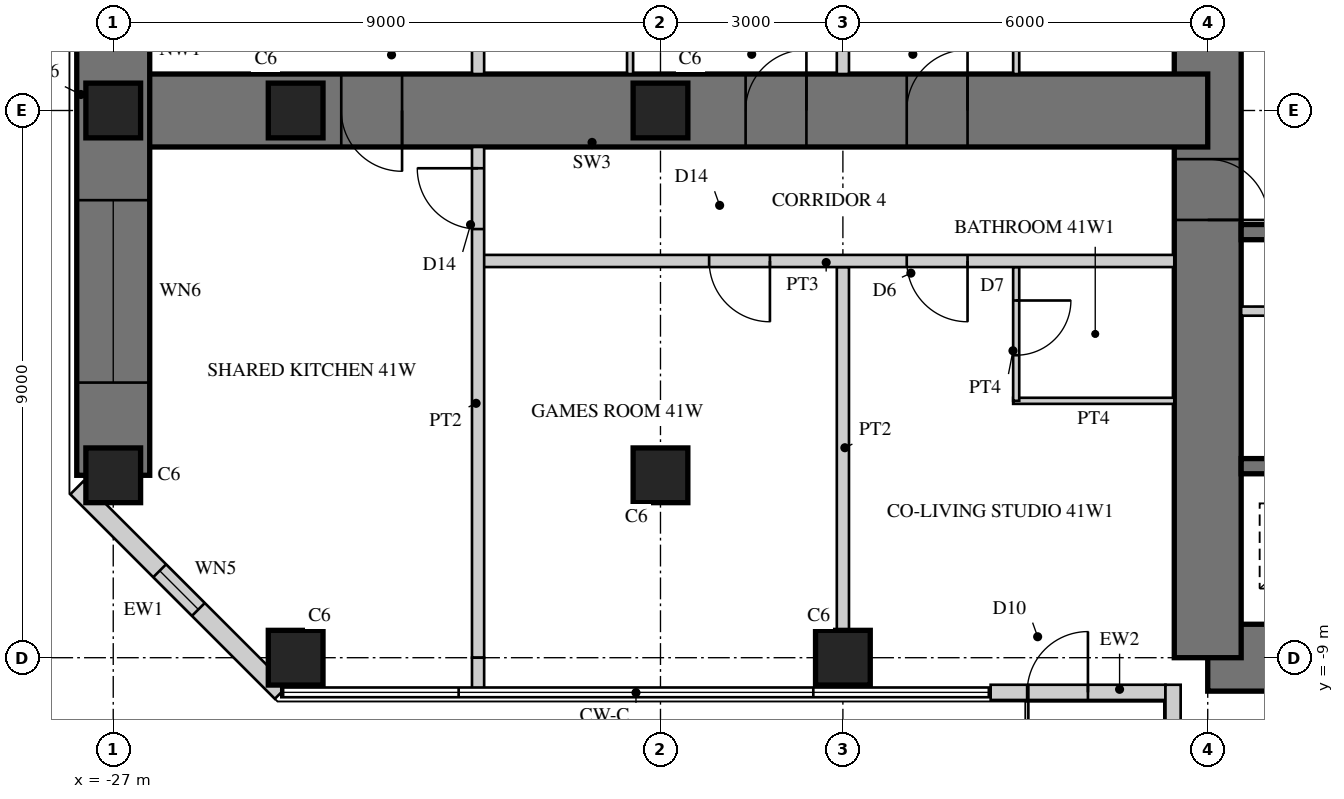
"""IFC4 building model, lengths in metres.
Left out: names, types, materials, properties, quantities, classifications, styles, units other than length and angle.
Written with IfcOpenShell. Run it as: python <this file> out.ifc"""

import sys

from ifc_helpers import new_model, si_unit, direction, frame, frame_2d, origin, origin_2d, place, context, subcontext, project, spatial, rectangle, hollow_rectangle, extrude, element, fill, save


model = new_model("IFC4")
c1 = context("Model", 3, precision=1e-05, world=origin(), true_north=direction((0.0, 1.0)))
c2 = subcontext(c1, "Body", "Model", "MODEL_VIEW")
j1 = project(units=[si_unit("LENGTHUNIT", "METRE"), si_unit("PLANEANGLEUNIT", "RADIAN")], contexts=[c1])
p1 = place(None, origin())
s1 = spatial("IfcSite", under=j1, at=p1, CompositionType="ELEMENT")
p2 = place(p1, origin())
s2 = spatial("IfcBuilding", under=s1, at=p2, CompositionType="ELEMENT")
p3 = place(p2, frame((0.0, 0.0, 169.5)))
s3 = spatial("IfcBuildingStorey", under=s2, at=p3, CompositionType="ELEMENT", Elevation=169.5)
p4 = place(p3, frame((-9.0, -9.0, 0.0), z_axis=(0.0, 0.0, 1.0), x_axis=(1.0, 0.0, 0.0)))
e1 = element("IfcWall", 1, at=p4, inside=s3, PredefinedType="SHEAR", context=c2, shape_type="SweptSolid", body=[
    extrude(rectangle(XDim=18.0, YDim=1.1, at=frame_2d((9.0, 0.0))), origin(), (0.0, 0.0, 1.0), 3.4),
])
p5 = place(p4, frame((9.8, 0.0, 0.0)))
e2 = element("IfcOpeningElement", 2, at=p5, cuts=e1, PredefinedType="OPENING", context=c2, shape_type="SweptSolid", body=[
    extrude(rectangle(XDim=1.0, YDim=2.4, at=frame_2d((0.5, 1.2))), frame((0.0, 0.56, 0.0), z_axis=(0.0, -1.0, 0.0), x_axis=(1.0, 0.0, 0.0)), (0.0, 0.0, 1.0), 1.12),
])
p6 = place(p3, frame((-9.0, 9.0, 0.0), z_axis=(0.0, 0.0, 1.0), x_axis=(0.0, -1.0, 0.0)))
e3 = element("IfcWall", 3, at=p6, inside=s3, PredefinedType="SHEAR", context=c2, shape_type="SweptSolid", body=[
    extrude(rectangle(XDim=18.0, YDim=1.1, at=frame_2d((9.0, 0.0))), origin(), (0.0, 0.0, 1.0), 3.4),
])
p7 = place(p6, frame((9.8, 0.0, 0.0)))
e4 = element("IfcOpeningElement", 4, at=p7, cuts=e3, PredefinedType="OPENING", context=c2, shape_type="SweptSolid", body=[
    extrude(rectangle(XDim=1.0, YDim=2.4, at=frame_2d((0.5, 1.2))), frame((0.0, 0.56, 0.0), z_axis=(0.0, -1.0, 0.0), x_axis=(1.0, 0.0, 0.0)), (0.0, 0.0, 1.0), 1.12),
])
p8 = place(p3, frame((-1.925, -2.0, 0.0), z_axis=(0.0, 0.0, 1.0), x_axis=(-1.0, 0.0, 0.0)))
e5 = element("IfcWall", 5, at=p8, inside=s3, PredefinedType="SHEAR", context=c2, shape_type="SweptSolid", body=[
    extrude(rectangle(XDim=6.525, YDim=0.25, at=frame_2d((3.262, 0.0))), origin(), (0.0, 0.0, 1.0), 3.4),
])
p9 = place(p3, frame((-1.925, -5.85, 0.0), z_axis=(0.0, 0.0, 1.0), x_axis=(-1.0, 0.0, 0.0)))
e6 = element("IfcWall", 6, at=p9, inside=s3, PredefinedType="SHEAR", context=c2, shape_type="SweptSolid", body=[
    extrude(rectangle(XDim=6.525, YDim=0.25, at=frame_2d((3.262, 0.0))), origin(), (0.0, 0.0, 1.0), 3.4),
])
p10 = place(p9, frame((0.471, 0.0, 0.0)))
e7 = element("IfcOpeningElement", 7, at=p10, cuts=e6, PredefinedType="OPENING", context=c2, shape_type="SweptSolid", body=[
    extrude(rectangle(XDim=1.1, YDim=2.2, at=frame_2d((0.55, 1.1))), frame((0.0, 0.135, 0.0), z_axis=(0.0, -1.0, 0.0), x_axis=(1.0, 0.0, 0.0)), (0.0, 0.0, 1.0), 0.27),
])
p11 = place(p9, frame((2.712, 0.0, 0.0)))
e8 = element("IfcOpeningElement", 8, at=p11, cuts=e6, PredefinedType="OPENING", context=c2, shape_type="SweptSolid", body=[
    extrude(rectangle(XDim=1.1, YDim=2.2, at=frame_2d((0.55, 1.1))), frame((0.0, 0.135, 0.0), z_axis=(0.0, -1.0, 0.0), x_axis=(1.0, 0.0, 0.0)), (0.0, 0.0, 1.0), 0.27),
])
p12 = place(p9, frame((4.954, 0.0, 0.0)))
e9 = element("IfcOpeningElement", 9, at=p12, cuts=e6, PredefinedType="OPENING", context=c2, shape_type="SweptSolid", body=[
    extrude(rectangle(XDim=1.1, YDim=2.2, at=frame_2d((0.55, 1.1))), frame((0.0, 0.135, 0.0), z_axis=(0.0, -1.0, 0.0), x_axis=(1.0, 0.0, 0.0)), (0.0, 0.0, 1.0), 0.27),
])
p13 = place(p3, frame((-1.925, -3.3, 0.0), z_axis=(0.0, 0.0, 1.0), x_axis=(-1.0, 0.0, 0.0)))
e10 = element("IfcWall", 10, at=p13, inside=s3, PredefinedType="PARTITIONING", context=c2, shape_type="SweptSolid", body=[
    extrude(rectangle(XDim=6.525, YDim=0.15, at=frame_2d((3.262, 0.0))), origin(), (0.0, 0.0, 1.0), 3.4),
])
p14 = place(p13, frame((0.075, 0.0, 0.0)))
e11 = element("IfcOpeningElement", 11, at=p14, cuts=e10, PredefinedType="OPENING", context=c2, shape_type="SweptSolid", body=[
    extrude(rectangle(XDim=0.8, YDim=2.1, at=frame_2d((0.4, 1.05))), frame((0.0, 0.085, 0.0), z_axis=(0.0, -1.0, 0.0), x_axis=(1.0, 0.0, 0.0)), (0.0, 0.0, 1.0), 0.17),
])
p15 = place(p13, frame((3.675, 0.0, 0.0)))
e12 = element("IfcOpeningElement", 12, at=p15, cuts=e10, PredefinedType="OPENING", context=c2, shape_type="SweptSolid", body=[
    extrude(rectangle(XDim=0.8, YDim=2.1, at=frame_2d((0.4, 1.05))), frame((0.0, 0.085, 0.0), z_axis=(0.0, -1.0, 0.0), x_axis=(1.0, 0.0, 0.0)), (0.0, 0.0, 1.0), 0.17),
])
p16 = place(p3, frame((-9.0, 0.0, 0.0), z_axis=(0.0, 0.0, 1.0), x_axis=(-1.0, 0.0, 0.0)))
e13 = element("IfcWall", 13, at=p16, inside=s3, PredefinedType="SHEAR", context=c2, shape_type="SweptSolid", body=[
    extrude(rectangle(XDim=18.0, YDim=1.2, at=frame_2d((9.0, 0.0))), origin(), (0.0, 0.0, 1.0), 3.4),
])
p17 = place(p16, frame((3.95, 0.0, 0.0)))
e14 = element("IfcOpeningElement", 14, at=p17, cuts=e13, PredefinedType="OPENING", context=c2, shape_type="SweptSolid", body=[
    extrude(rectangle(XDim=1.0, YDim=2.15, at=frame_2d((0.5, 1.075))), frame((0.0, 0.61, 0.0), z_axis=(0.0, -1.0, 0.0), x_axis=(1.0, 0.0, 0.0)), (0.0, 0.0, 1.0), 1.22),
])
p18 = place(p16, frame((6.6, 0.0, 0.0)))
e15 = element("IfcOpeningElement", 15, at=p18, cuts=e13, PredefinedType="OPENING", context=c2, shape_type="SweptSolid", body=[
    extrude(rectangle(XDim=1.0, YDim=2.15, at=frame_2d((0.5, 1.075))), frame((0.0, 0.61, 0.0), z_axis=(0.0, -1.0, 0.0), x_axis=(1.0, 0.0, 0.0)), (0.0, 0.0, 1.0), 1.22),
])
p19 = place(p16, frame((13.25, 0.0, 0.0)))
e16 = element("IfcOpeningElement", 16, at=p19, cuts=e13, PredefinedType="OPENING", context=c2, shape_type="SweptSolid", body=[
    extrude(rectangle(XDim=1.0, YDim=2.2, at=frame_2d((0.5, 1.1))), frame((0.0, 0.61, 0.0), z_axis=(0.0, -1.0, 0.0), x_axis=(1.0, 0.0, 0.0)), (0.0, 0.0, 1.0), 1.22),
])
p20 = place(p3, frame((-27.0, 6.0, 0.0), z_axis=(0.0, 0.0, 1.0), x_axis=(0.0, -1.0, 0.0)))
e17 = element("IfcWall", 17, at=p20, inside=s3, PredefinedType="SHEAR", context=c2, shape_type="SweptSolid", body=[
    extrude(rectangle(XDim=12.0, YDim=1.2, at=frame_2d((6.0, 0.0))), origin(), (0.0, 0.0, 1.0), 3.4),
])
p21 = place(p20, frame((1.525, 0.0, 0.6)))
e18 = element("IfcOpeningElement", 18, at=p21, cuts=e17, PredefinedType="OPENING", context=c2, shape_type="SweptSolid", body=[
    extrude(rectangle(XDim=3.0, YDim=2.4, at=frame_2d((1.5, 1.2))), frame((0.0, 0.61, 0.0), z_axis=(0.0, -1.0, 0.0), x_axis=(1.0, 0.0, 0.0)), (0.0, 0.0, 1.0), 1.22),
])
p22 = place(p20, frame((7.475, 0.0, 0.6)))
e19 = element("IfcOpeningElement", 19, at=p22, cuts=e17, PredefinedType="OPENING", context=c2, shape_type="SweptSolid", body=[
    extrude(rectangle(XDim=3.0, YDim=2.4, at=frame_2d((1.5, 1.2))), frame((0.0, 0.61, 0.0), z_axis=(0.0, -1.0, 0.0), x_axis=(1.0, 0.0, 0.0)), (0.0, 0.0, 1.0), 1.22),
])
for number, where, z_axis, x_axis in (
    (20, (-15.0, -9.0, 0.0), (0.0, 0.0, 1.0), (1.0, 0.0, 0.0)),
    (21, (-24.0, -9.0, 0.0), (0.0, 0.0, 1.0), (1.0, 0.0, 0.0)),
    (22, (-27.0, 0.0, 0.0), (0.0, 0.0, 1.0), (1.0, 0.0, 0.0)),
    (23, (-27.0, -6.0, 0.0), (0.0, 0.0, 1.0), (1.0, 0.0, 0.0)),
    (24, (-18.0, 0.0, 0.0), (0.0, 0.0, 1.0), (1.0, 0.0, 0.0)),
    (25, (-18.0, -6.0, 0.0), (0.0, 0.0, 1.0), (1.0, 0.0, 0.0)),
    (26, (-24.0, 0.0, 0.0), (0.0, 0.0, 1.0), (1.0, 0.0, 0.0)),
):
    element("IfcColumn", number, at=place(p3, frame(where, z_axis=z_axis, x_axis=x_axis)), inside=s3, PredefinedType="COLUMN", context=c2, shape_type="SweptSolid", body=[
        extrude(rectangle(XDim=0.9, YDim=0.9, at=origin_2d()), origin(), (0.0, 0.0, 1.0), 3.4),
    ])
p23 = place(p3, frame((-27.6, -6.206, 0.0), z_axis=(0.0, 0.0, 1.0), x_axis=(0.707106781187, -0.707106781187, 0.0)))
e27 = element("IfcWall", 27, at=p23, inside=s3, PredefinedType="SOLIDWALL", context=c2, shape_type="SweptSolid", body=[
    extrude(rectangle(XDim=4.757, YDim=0.3, at=frame_2d((2.379, 0.0))), origin(), (0.0, 0.0, 1.0), 3.22),
])
p24 = place(p23, frame((1.929, 0.0, 0.3)))
e28 = element("IfcOpeningElement", 28, at=p24, cuts=e27, PredefinedType="OPENING", context=c2, shape_type="SweptSolid", body=[
    extrude(rectangle(XDim=0.9, YDim=2.4, at=frame_2d((0.45, 1.2))), frame((0.0, 0.16, 0.0), z_axis=(0.0, -1.0, 0.0), x_axis=(1.0, 0.0, 0.0)), (0.0, 0.0, 1.0), 0.32),
])
p25 = place(p3, frame((-12.57, -9.57, 0.0), z_axis=(0.0, 0.0, 1.0), x_axis=(1.0, 0.0, 0.0)))
e29 = element("IfcWall", 29, at=p25, inside=s3, PredefinedType="SOLIDWALL", context=c2, shape_type="SweptSolid", body=[
    extrude(rectangle(XDim=2.875, YDim=0.25, at=frame_2d((1.438, 0.0))), origin(), (0.0, 0.0, 1.0), 3.22),
])
p26 = place(p25, frame((0.6, 0.0, 0.0)))
e30 = element("IfcOpeningElement", 30, at=p26, cuts=e29, PredefinedType="OPENING", context=c2, shape_type="SweptSolid", body=[
    extrude(rectangle(XDim=1.0, YDim=2.2, at=frame_2d((0.5, 1.1))), frame((0.0, 0.135, 0.0), z_axis=(0.0, -1.0, 0.0), x_axis=(1.0, 0.0, 0.0)), (0.0, 0.0, 1.0), 0.27),
])
p27 = place(p3, frame((-9.57, -9.445, 0.0), z_axis=(0.0, 0.0, 1.0), x_axis=(0.0, -1.0, 0.0)))
e31 = element("IfcWall", 31, at=p27, inside=s3, PredefinedType="SOLIDWALL", context=c2, shape_type="SweptSolid", body=[
    extrude(rectangle(XDim=3.125, YDim=0.25, at=frame_2d((1.562, 0.0))), origin(), (0.0, 0.0, 1.0), 3.22),
])
p28 = place(p27, frame((0.6, 0.0, 0.0)))
e32 = element("IfcOpeningElement", 32, at=p28, cuts=e31, PredefinedType="OPENING", context=c2, shape_type="SweptSolid", body=[
    extrude(rectangle(XDim=1.0, YDim=2.2, at=frame_2d((0.5, 1.1))), frame((0.0, 0.135, 0.0), z_axis=(0.0, -1.0, 0.0), x_axis=(1.0, 0.0, 0.0)), (0.0, 0.0, 1.0), 0.27),
])
p29 = place(p3, frame((-9.55, -4.775, 0.0), z_axis=(0.0, 0.0, 1.0), x_axis=(-1.0, 0.0, 0.0)))
e33 = element("IfcWall", 33, at=p29, inside=s3, PredefinedType="PARTITIONING", context=c2, shape_type="SweptSolid", body=[
    extrude(rectangle(XDim=2.65, YDim=0.1, at=frame_2d((1.325, 0.0))), origin(), (0.0, 0.0, 1.0), 3.22),
])
p30 = place(p3, frame((-12.15, -2.575, 0.0), z_axis=(0.0, 0.0, 1.0), x_axis=(0.0, -1.0, 0.0)))
e34 = element("IfcWall", 34, at=p30, inside=s3, PredefinedType="PARTITIONING", context=c2, shape_type="SweptSolid", body=[
    extrude(rectangle(XDim=2.2, YDim=0.1, at=frame_2d((1.1, 0.0))), origin(), (0.0, 0.0, 1.0), 3.22),
])
p31 = place(p30, frame((0.55, 0.0, 0.0)))
e35 = element("IfcOpeningElement", 35, at=p31, cuts=e34, PredefinedType="OPENING", context=c2, shape_type="SweptSolid", body=[
    extrude(rectangle(XDim=0.9, YDim=2.1, at=frame_2d((0.45, 1.05))), frame((0.0, 0.06, 0.0), z_axis=(0.0, -1.0, 0.0), x_axis=(1.0, 0.0, 0.0)), (0.0, 0.0, 1.0), 0.12),
])
p32 = place(p3, frame((-12.15, 9.445, 0.0), z_axis=(0.0, 0.0, 1.0), x_axis=(0.0, -1.0, 0.0)))
e36 = element("IfcWall", 36, at=p32, inside=s3, PredefinedType="PARTITIONING", context=c2, shape_type="SweptSolid", body=[
    extrude(rectangle(XDim=8.845, YDim=0.1, at=frame_2d((4.422, 0.0))), origin(), (0.0, 0.0, 1.0), 3.22),
])
p33 = place(p32, frame((5.295, 0.0, 0.0)))
e37 = element("IfcOpeningElement", 37, at=p33, cuts=e36, PredefinedType="OPENING", context=c2, shape_type="SweptSolid", body=[
    extrude(rectangle(XDim=0.9, YDim=2.1, at=frame_2d((0.45, 1.05))), frame((0.0, 0.06, 0.0), z_axis=(0.0, -1.0, 0.0), x_axis=(1.0, 0.0, 0.0)), (0.0, 0.0, 1.0), 0.12),
])
p34 = place(p32, frame((7.395, 0.0, 0.0)))
e38 = element("IfcOpeningElement", 38, at=p34, cuts=e36, PredefinedType="OPENING", context=c2, shape_type="SweptSolid", body=[
    extrude(rectangle(XDim=0.9, YDim=2.1, at=frame_2d((0.45, 1.05))), frame((0.0, 0.06, 0.0), z_axis=(0.0, -1.0, 0.0), x_axis=(1.0, 0.0, 0.0)), (0.0, 0.0, 1.0), 0.12),
])
p35 = place(p3, frame((-15.0, -2.575, 0.0), z_axis=(0.0, 0.0, 1.0), x_axis=(0.0, -1.0, 0.0)))
e39 = element("IfcWall", 39, at=p35, inside=s3, PredefinedType="SOLIDWALL", context=c2, shape_type="SweptSolid", body=[
    extrude(rectangle(XDim=5.975, YDim=0.2, at=frame_2d((2.988, 0.0))), origin(), (0.0, 0.0, 1.0), 2.47),
])
p36 = place(p3, frame((-15.0, 8.55, 0.0), z_axis=(0.0, 0.0, 1.0), x_axis=(0.0, -1.0, 0.0)))
e40 = element("IfcWall", 40, at=p36, inside=s3, PredefinedType="SOLIDWALL", context=c2, shape_type="SweptSolid", body=[
    extrude(rectangle(XDim=7.95, YDim=0.2, at=frame_2d((3.975, 0.0))), origin(), (0.0, 0.0, 1.0), 2.47),
])
p37 = place(p3, frame((-18.5, 2.8, 0.0), z_axis=(0.0, 0.0, 1.0), x_axis=(0.0, -1.0, 0.0)))
e41 = element("IfcWall", 41, at=p37, inside=s3, PredefinedType="PARTITIONING", context=c2, shape_type="SweptSolid", body=[
    extrude(rectangle(XDim=2.2, YDim=0.1, at=frame_2d((1.1, 0.0))), origin(), (0.0, 0.0, 1.0), 3.22),
])
p38 = place(p37, frame((0.55, 0.0, 0.0)))
e42 = element("IfcOpeningElement", 42, at=p38, cuts=e41, PredefinedType="OPENING", context=c2, shape_type="SweptSolid", body=[
    extrude(rectangle(XDim=0.9, YDim=2.1, at=frame_2d((0.45, 1.05))), frame((0.0, 0.06, 0.0), z_axis=(0.0, -1.0, 0.0), x_axis=(1.0, 0.0, 0.0)), (0.0, 0.0, 1.0), 0.12),
])
p39 = place(p3, frame((-9.55, -2.475, 0.0), z_axis=(0.0, 0.0, 1.0), x_axis=(-1.0, 0.0, 0.0)))
e43 = element("IfcWall", 43, at=p39, inside=s3, PredefinedType="SOLIDWALL", context=c2, shape_type="SweptSolid", body=[
    extrude(rectangle(XDim=11.45, YDim=0.2, at=frame_2d((5.725, 0.0))), origin(), (0.0, 0.0, 1.0), 3.22),
])
p40 = place(p39, frame((3.4, 0.0, 0.0)))
e44 = element("IfcOpeningElement", 44, at=p40, cuts=e43, PredefinedType="OPENING", context=c2, shape_type="SweptSolid", body=[
    extrude(rectangle(XDim=1.0, YDim=2.15, at=frame_2d((0.5, 1.075))), frame((0.0, 0.11, 0.0), z_axis=(0.0, -1.0, 0.0), x_axis=(1.0, 0.0, 0.0)), (0.0, 0.0, 1.0), 0.22),
])
p41 = place(p39, frame((6.65, 0.0, 0.0)))
e45 = element("IfcOpeningElement", 45, at=p41, cuts=e43, PredefinedType="OPENING", context=c2, shape_type="SweptSolid", body=[
    extrude(rectangle(XDim=1.0, YDim=2.2, at=frame_2d((0.5, 1.1))), frame((0.0, 0.11, 0.0), z_axis=(0.0, -1.0, 0.0), x_axis=(1.0, 0.0, 0.0)), (0.0, 0.0, 1.0), 0.22),
])
p42 = place(p3, frame((-21.0, 9.0, 0.0), z_axis=(0.0, 0.0, 1.0), x_axis=(0.0, -1.0, 0.0)))
e46 = element("IfcWall", 46, at=p42, inside=s3, PredefinedType="SOLIDWALL", context=c2, shape_type="SweptSolid", body=[
    extrude(rectangle(XDim=8.4, YDim=0.2, at=frame_2d((4.2, 0.0))), origin(), (0.0, 0.0, 1.0), 2.62),
])
p43 = place(p3, frame((-21.0, -0.6, 0.0), z_axis=(0.0, 0.0, 1.0), x_axis=(0.0, -1.0, 0.0)))
e47 = element("IfcWall", 47, at=p43, inside=s3, PredefinedType="SOLIDWALL", context=c2, shape_type="SweptSolid", body=[
    extrude(rectangle(XDim=8.4, YDim=0.2, at=frame_2d((4.2, 0.0))), origin(), (0.0, 0.0, 1.0), 2.62),
])
p44 = place(p43, frame((0.35, 0.0, 0.0)))
e48 = element("IfcOpeningElement", 48, at=p44, cuts=e47, PredefinedType="OPENING", context=c2, shape_type="SweptSolid", body=[
    extrude(rectangle(XDim=1.0, YDim=2.2, at=frame_2d((0.5, 1.1))), frame((0.0, 0.11, 0.0), z_axis=(0.0, -1.0, 0.0), x_axis=(1.0, 0.0, 0.0)), (0.0, 0.0, 1.0), 0.22),
])
p45 = place(p3, frame((-21.0, -9.0, 0.0), z_axis=(0.0, 0.0, 1.0), x_axis=(0.0, -1.0, 0.0)))
e49 = element("IfcWall", 49, at=p45, inside=s3, PredefinedType="SOLIDWALL", context=c2, shape_type="SweptSolid", body=[
    extrude(rectangle(XDim=0.53, YDim=0.2, at=frame_2d((0.265, 0.0))), origin(), (0.0, 0.0, 1.0), 3.22),
])
p46 = place(p22, origin())
e50 = element("IfcWindow", 50, at=p46, inside=s3, PartitioningType="SINGLE_PANEL", PredefinedType="WINDOW", context=c2, shape_type="SweptSolid", body=[
    extrude(hollow_rectangle(XDim=3.0, YDim=2.4, WallThickness=0.06, at=frame_2d((1.5, 1.2))), frame((0.0, 0.03, 0.0), z_axis=(0.0, -1.0, 0.0), x_axis=(1.0, 0.0, 0.0)), (0.0, 0.0, 1.0), 0.06),
    extrude(rectangle(XDim=2.879, YDim=2.279, at=frame_2d((1.5, 1.2))), frame((0.0, 0.03, 0.0), z_axis=(0.0, -1.0, 0.0), x_axis=(1.0, 0.0, 0.0)), (0.0, 0.0, 1.0), 0.06),
])
fill(e19, e50)
p47 = place(p24, origin())
e51 = element("IfcWindow", 51, at=p47, inside=s3, PartitioningType="SINGLE_PANEL", PredefinedType="WINDOW", context=c2, shape_type="SweptSolid", body=[
    extrude(hollow_rectangle(XDim=0.9, YDim=2.4, WallThickness=0.06, at=frame_2d((0.45, 1.2))), frame((0.0, 0.03, 0.0), z_axis=(0.0, -1.0, 0.0), x_axis=(1.0, 0.0, 0.0)), (0.0, 0.0, 1.0), 0.06),
    extrude(rectangle(XDim=0.779, YDim=2.279, at=frame_2d((0.45, 1.2))), frame((0.0, 0.03, 0.0), z_axis=(0.0, -1.0, 0.0), x_axis=(1.0, 0.0, 0.0)), (0.0, 0.0, 1.0), 0.06),
])
fill(e28, e51)
p48 = place(p26, origin())
e52 = element("IfcDoor", 52, at=p48, inside=s3, OperationType="SINGLE_SWING_RIGHT", PredefinedType="DOOR", context=c2, shape_type="SweptSolid", body=[
    extrude(hollow_rectangle(XDim=1.0, YDim=2.2, WallThickness=0.06, at=frame_2d((0.5, 1.1))), frame((0.0, 0.025, 0.0), z_axis=(0.0, -1.0, 0.0), x_axis=(1.0, 0.0, 0.0)), (0.0, 0.0, 1.0), 0.05),
    extrude(rectangle(XDim=0.879, YDim=2.079, at=frame_2d((0.5, 1.1))), frame((0.0, 0.025, 0.0), z_axis=(0.0, -1.0, 0.0), x_axis=(1.0, 0.0, 0.0)), (0.0, 0.0, 1.0), 0.05),
])
fill(e30, e52)
p49 = place(p31, origin())
e53 = element("IfcDoor", 53, at=p49, inside=s3, OperationType="SINGLE_SWING_LEFT", PredefinedType="DOOR", context=c2, shape_type="SweptSolid", body=[
    extrude(rectangle(XDim=0.9, YDim=2.1, at=frame_2d((0.45, 1.05))), frame((0.0, 0.025, 0.0), z_axis=(0.0, -1.0, 0.0), x_axis=(1.0, 0.0, 0.0)), (0.0, 0.0, 1.0), 0.05),
])
fill(e35, e53)
p50 = place(p40, origin())
e54 = element("IfcDoor", 54, at=p50, inside=s3, OperationType="SINGLE_SWING_LEFT", PredefinedType="DOOR", context=c2, shape_type="SweptSolid", body=[
    extrude(rectangle(XDim=1.0, YDim=2.15, at=frame_2d((0.5, 1.075))), frame((0.0, 0.025, 0.0), z_axis=(0.0, -1.0, 0.0), x_axis=(1.0, 0.0, 0.0)), (0.0, 0.0, 1.0), 0.05),
])
fill(e44, e54)
p51 = place(p41, origin())
e55 = element("IfcDoor", 55, at=p51, inside=s3, OperationType="SINGLE_SWING_LEFT", PredefinedType="DOOR", context=c2, shape_type="SweptSolid", body=[
    extrude(rectangle(XDim=1.0, YDim=2.2, at=frame_2d((0.5, 1.1))), frame((0.0, 0.025, 0.0), z_axis=(0.0, -1.0, 0.0), x_axis=(1.0, 0.0, 0.0)), (0.0, 0.0, 1.0), 0.05),
])
fill(e45, e55)
p52 = place(p44, frame((1.0, 0.0, 0.0), z_axis=(0.0, 0.0, 1.0), x_axis=(-1.0, 0.0, 0.0)))
e56 = element("IfcDoor", 56, at=p52, inside=s3, OperationType="SINGLE_SWING_RIGHT", PredefinedType="DOOR", context=c2, shape_type="SweptSolid", body=[
    extrude(rectangle(XDim=1.0, YDim=2.2, at=frame_2d((0.5, 1.1))), frame((0.0, 0.025, 0.0), z_axis=(0.0, -1.0, 0.0), x_axis=(1.0, 0.0, 0.0)), (0.0, 0.0, 1.0), 0.05),
])
fill(e48, e56)
p53 = place(p17, frame((1.0, 0.0, 0.0), z_axis=(0.0, 0.0, 1.0), x_axis=(-1.0, 0.0, 0.0)))
e57 = element("IfcDoor", 57, at=p53, inside=s3, OperationType="SINGLE_SWING_RIGHT", PredefinedType="DOOR", context=c2, shape_type="SweptSolid", body=[
    extrude(rectangle(XDim=1.0, YDim=2.15, at=frame_2d((0.5, 1.075))), frame((0.0, 0.025, 0.0), z_axis=(0.0, -1.0, 0.0), x_axis=(1.0, 0.0, 0.0)), (0.0, 0.0, 1.0), 0.05),
])
fill(e14, e57)
p54 = place(p18, frame((1.0, 0.0, 0.0), z_axis=(0.0, 0.0, 1.0), x_axis=(-1.0, 0.0, 0.0)))
e58 = element("IfcDoor", 58, at=p54, inside=s3, OperationType="SINGLE_SWING_RIGHT", PredefinedType="DOOR", context=c2, shape_type="SweptSolid", body=[
    extrude(rectangle(XDim=1.0, YDim=2.15, at=frame_2d((0.5, 1.075))), frame((0.0, 0.025, 0.0), z_axis=(0.0, -1.0, 0.0), x_axis=(1.0, 0.0, 0.0)), (0.0, 0.0, 1.0), 0.05),
])
fill(e15, e58)
p55 = place(p19, origin())
e59 = element("IfcDoor", 59, at=p55, inside=s3, OperationType="SINGLE_SWING_LEFT", PredefinedType="DOOR", context=c2, shape_type="SweptSolid", body=[
    extrude(rectangle(XDim=1.0, YDim=2.2, at=frame_2d((0.5, 1.1))), frame((0.0, 0.025, 0.0), z_axis=(0.0, -1.0, 0.0), x_axis=(1.0, 0.0, 0.0)), (0.0, 0.0, 1.0), 0.05),
])
fill(e16, e59)
p56 = place(p7, origin())
e60 = element("IfcDoor", 60, at=p56, inside=s3, OperationType="SINGLE_SWING_RIGHT", PredefinedType="DOOR", context=c2, shape_type="SweptSolid", body=[
    extrude(rectangle(XDim=1.0, YDim=2.4, at=frame_2d((0.5, 1.2))), frame((0.0, 0.055, 0.0), z_axis=(0.0, -1.0, 0.0), x_axis=(1.0, 0.0, 0.0)), (0.0, 0.0, 1.0), 0.05),
])
fill(e4, e60)
save(model, sys.argv[1])
